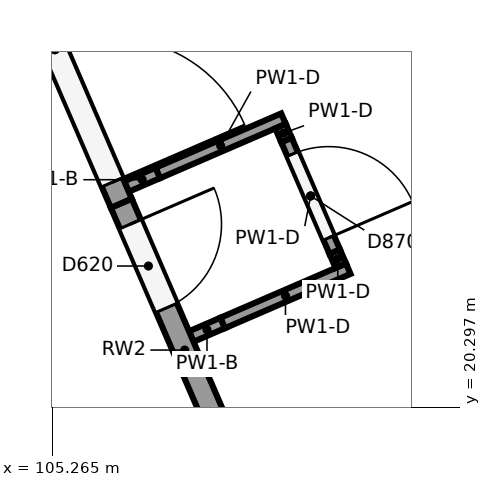
"""IFC4 building model, lengths in metres.
Left out: names, types, materials, properties, quantities, classifications, styles, units other than length and angle.
Written with IfcOpenShell. Run it as: python <this file> out.ifc"""

import sys

from ifc_helpers import new_model, si_unit, direction, frame, frame_2d, origin, place, context, subcontext, project, spatial, rectangle, extrude, element, fill, save


model = new_model("IFC4")
c1 = context("Model", 3, precision=1e-05, world=origin(), true_north=direction((0.0, 1.0)))
c2 = subcontext(c1, "Body", "Model", "MODEL_VIEW")
j1 = project(units=[si_unit("LENGTHUNIT", "METRE"), si_unit("PLANEANGLEUNIT", "RADIAN")], contexts=[c1])
p1 = place(None, origin())
s1 = spatial("IfcSite", under=j1, at=p1, CompositionType="ELEMENT")
p2 = place(p1, origin())
s2 = spatial("IfcBuilding", under=s1, at=p2, CompositionType="ELEMENT")
p3 = place(p2, origin())
s3 = spatial("IfcBuildingStorey", under=s2, at=p3, CompositionType="ELEMENT", Elevation=0.0)
p4 = place(p3, frame((104.427, 27.02, 0.0), z_axis=(0.0, 0.0, 1.0), x_axis=(0.396623075329, -0.917981555434, 0.0)))
e1 = element("IfcWall", 1, at=p4, inside=s3, PredefinedType="SOLIDWALL", context=c2, shape_type="SweptSolid", body=[
    extrude(rectangle(XDim=4.4, YDim=0.3, at=frame_2d((2.2, 0.0))), origin(), (0.0, 0.0, 1.0), 4.85),
])
p5 = place(p4, frame((0.3, 0.0, 0.0)))
e2 = element("IfcOpeningElement", 2, at=p5, cuts=e1, PredefinedType="OPENING", context=c2, shape_type="SweptSolid", body=[
    extrude(rectangle(XDim=3.8, YDim=2.8, at=frame_2d((1.9, 1.4))), frame((0.0, 0.16, 0.0), z_axis=(0.0, -1.0, 0.0), x_axis=(1.0, 0.0, 0.0)), (0.0, 0.0, 1.0), 0.32),
])
p6 = place(p3, frame((106.173, 22.98, 0.0), z_axis=(0.0, 0.0, 1.0), x_axis=(0.396529362849, -0.918022039168, 0.0)))
e3 = element("IfcWall", 3, at=p6, inside=s3, PredefinedType="SOLIDWALL", context=c2, shape_type="SweptSolid", body=[
    extrude(rectangle(XDim=4.208, YDim=0.3, at=frame_2d((2.104, 0.0))), origin(), (0.0, 0.0, 1.0), 4.85),
])
p7 = place(p6, frame((0.3, 0.0, 0.0)))
e4 = element("IfcOpeningElement", 4, at=p7, cuts=e3, PredefinedType="OPENING", context=c2, shape_type="SweptSolid", body=[
    extrude(rectangle(XDim=1.2, YDim=2.1, at=frame_2d((0.6, 1.05))), frame((0.0, 0.16, 0.0), z_axis=(0.0, -1.0, 0.0), x_axis=(1.0, 0.0, 0.0)), (0.0, 0.0, 1.0), 0.32),
])
p8 = place(p3, frame((106.241, 23.2, 0.0), z_axis=(0.0, 0.0, 1.0), x_axis=(0.91799053418, 0.396602293431, 0.0)))
e5 = element("IfcWall", 5, at=p8, inside=s3, PredefinedType="PARTITIONING", context=c2, shape_type="SweptSolid", body=[
    extrude(rectangle(XDim=0.45, YDim=0.15, at=frame_2d((0.225, 0.0))), origin(), (0.0, 0.0, 1.0), 4.85),
])
p9 = place(p3, frame((106.654, 23.379, 0.0), z_axis=(0.0, 0.0, 1.0), x_axis=(0.918011864983, 0.39655291671, 0.0)))
e6 = element("IfcWall", 6, at=p9, inside=s3, PredefinedType="PARTITIONING", context=c2, shape_type="SweptSolid", body=[
    extrude(rectangle(XDim=1.8, YDim=0.15, at=frame_2d((0.9, 0.0))), origin(), (0.0, 0.0, 1.0), 6.1),
])
p10 = place(p3, frame((107.094, 21.227, 0.0), z_axis=(0.0, 0.0, 1.0), x_axis=(0.91799053418, 0.396602293431, 0.0)))
e7 = element("IfcWall", 7, at=p10, inside=s3, PredefinedType="PARTITIONING", context=c2, shape_type="SweptSolid", body=[
    extrude(rectangle(XDim=0.45, YDim=0.15, at=frame_2d((0.225, 0.0))), origin(), (0.0, 0.0, 1.0), 4.85),
])
p11 = place(p3, frame((107.507, 21.405, 0.0), z_axis=(0.0, 0.0, 1.0), x_axis=(0.91799053418, 0.396602293431, 0.0)))
e8 = element("IfcWall", 8, at=p11, inside=s3, PredefinedType="PARTITIONING", context=c2, shape_type="SweptSolid", body=[
    extrude(rectangle(XDim=1.8, YDim=0.15, at=frame_2d((0.9, 0.0))), origin(), (0.0, 0.0, 1.0), 6.1),
])
p12 = place(p3, frame((108.267, 23.994, 0.0), z_axis=(0.0, 0.0, 1.0), x_axis=(0.396716586321, -0.917941147426, 0.0)))
e9 = element("IfcWall", 9, at=p12, inside=s3, PredefinedType="PARTITIONING", context=c2, shape_type="SweptSolid", body=[
    extrude(rectangle(XDim=0.2, YDim=0.15, at=frame_2d((0.1, 0.0))), origin(), (0.0, 0.0, 1.0), 6.1),
])
p13 = place(p3, frame((108.346, 23.811, 0.0), z_axis=(0.0, 0.0, 1.0), x_axis=(0.396588005523, -0.917996706898, 0.0)))
e10 = element("IfcWall", 10, at=p13, inside=s3, PredefinedType="PARTITIONING", context=c2, shape_type="SweptSolid", body=[
    extrude(rectangle(XDim=1.6, YDim=0.15, at=frame_2d((0.8, 0.0))), origin(), (0.0, 0.0, 1.0), 6.1),
])
p14 = place(p13, frame((0.2, 0.0, 0.0)))
e11 = element("IfcOpeningElement", 11, at=p14, cuts=e10, PredefinedType="OPENING", context=c2, shape_type="SweptSolid", body=[
    extrude(rectangle(XDim=1.2, YDim=2.1, at=frame_2d((0.6, 1.05))), frame((0.0, 0.085, 0.0), z_axis=(0.0, -1.0, 0.0), x_axis=(1.0, 0.0, 0.0)), (0.0, 0.0, 1.0), 0.17),
])
p15 = place(p3, frame((108.981, 22.342, 0.0), z_axis=(0.0, 0.0, 1.0), x_axis=(0.396716586321, -0.917941147426, 0.0)))
e12 = element("IfcWall", 12, at=p15, inside=s3, PredefinedType="PARTITIONING", context=c2, shape_type="SweptSolid", body=[
    extrude(rectangle(XDim=0.2, YDim=0.15, at=frame_2d((0.1, 0.0))), origin(), (0.0, 0.0, 1.0), 6.1),
])
p16 = place(p5, origin())
e13 = element("IfcDoor", 13, at=p16, inside=s3, OperationType="DOUBLE_DOOR_SINGLE_SWING", PredefinedType="DOOR", context=c2, shape_type="SweptSolid", body=[
    extrude(rectangle(XDim=3.8, YDim=2.8, at=frame_2d((1.9, 1.4))), frame((0.0, 0.025, 0.0), z_axis=(0.0, -1.0, 0.0), x_axis=(1.0, 0.0, 0.0)), (0.0, 0.0, 1.0), 0.05),
])
fill(e2, e13)
p17 = place(p7, origin())
e14 = element("IfcDoor", 14, at=p17, inside=s3, OperationType="SINGLE_SWING_LEFT", PredefinedType="DOOR", context=c2, shape_type="SweptSolid", body=[
    extrude(rectangle(XDim=1.2, YDim=2.1, at=frame_2d((0.6, 1.05))), frame((0.0, 0.025, 0.0), z_axis=(0.0, -1.0, 0.0), x_axis=(1.0, 0.0, 0.0)), (0.0, 0.0, 1.0), 0.05),
])
fill(e4, e14)
p18 = place(p14, origin())
e15 = element("IfcDoor", 15, at=p18, inside=s3, OperationType="SINGLE_SWING_RIGHT", PredefinedType="DOOR", context=c2, shape_type="SweptSolid", body=[
    extrude(rectangle(XDim=1.2, YDim=2.1, at=frame_2d((0.6, 1.05))), frame((0.0, 0.025, 0.0), z_axis=(0.0, -1.0, 0.0), x_axis=(1.0, 0.0, 0.0)), (0.0, 0.0, 1.0), 0.05),
])
fill(e11, e15)
save(model, sys.argv[1])
